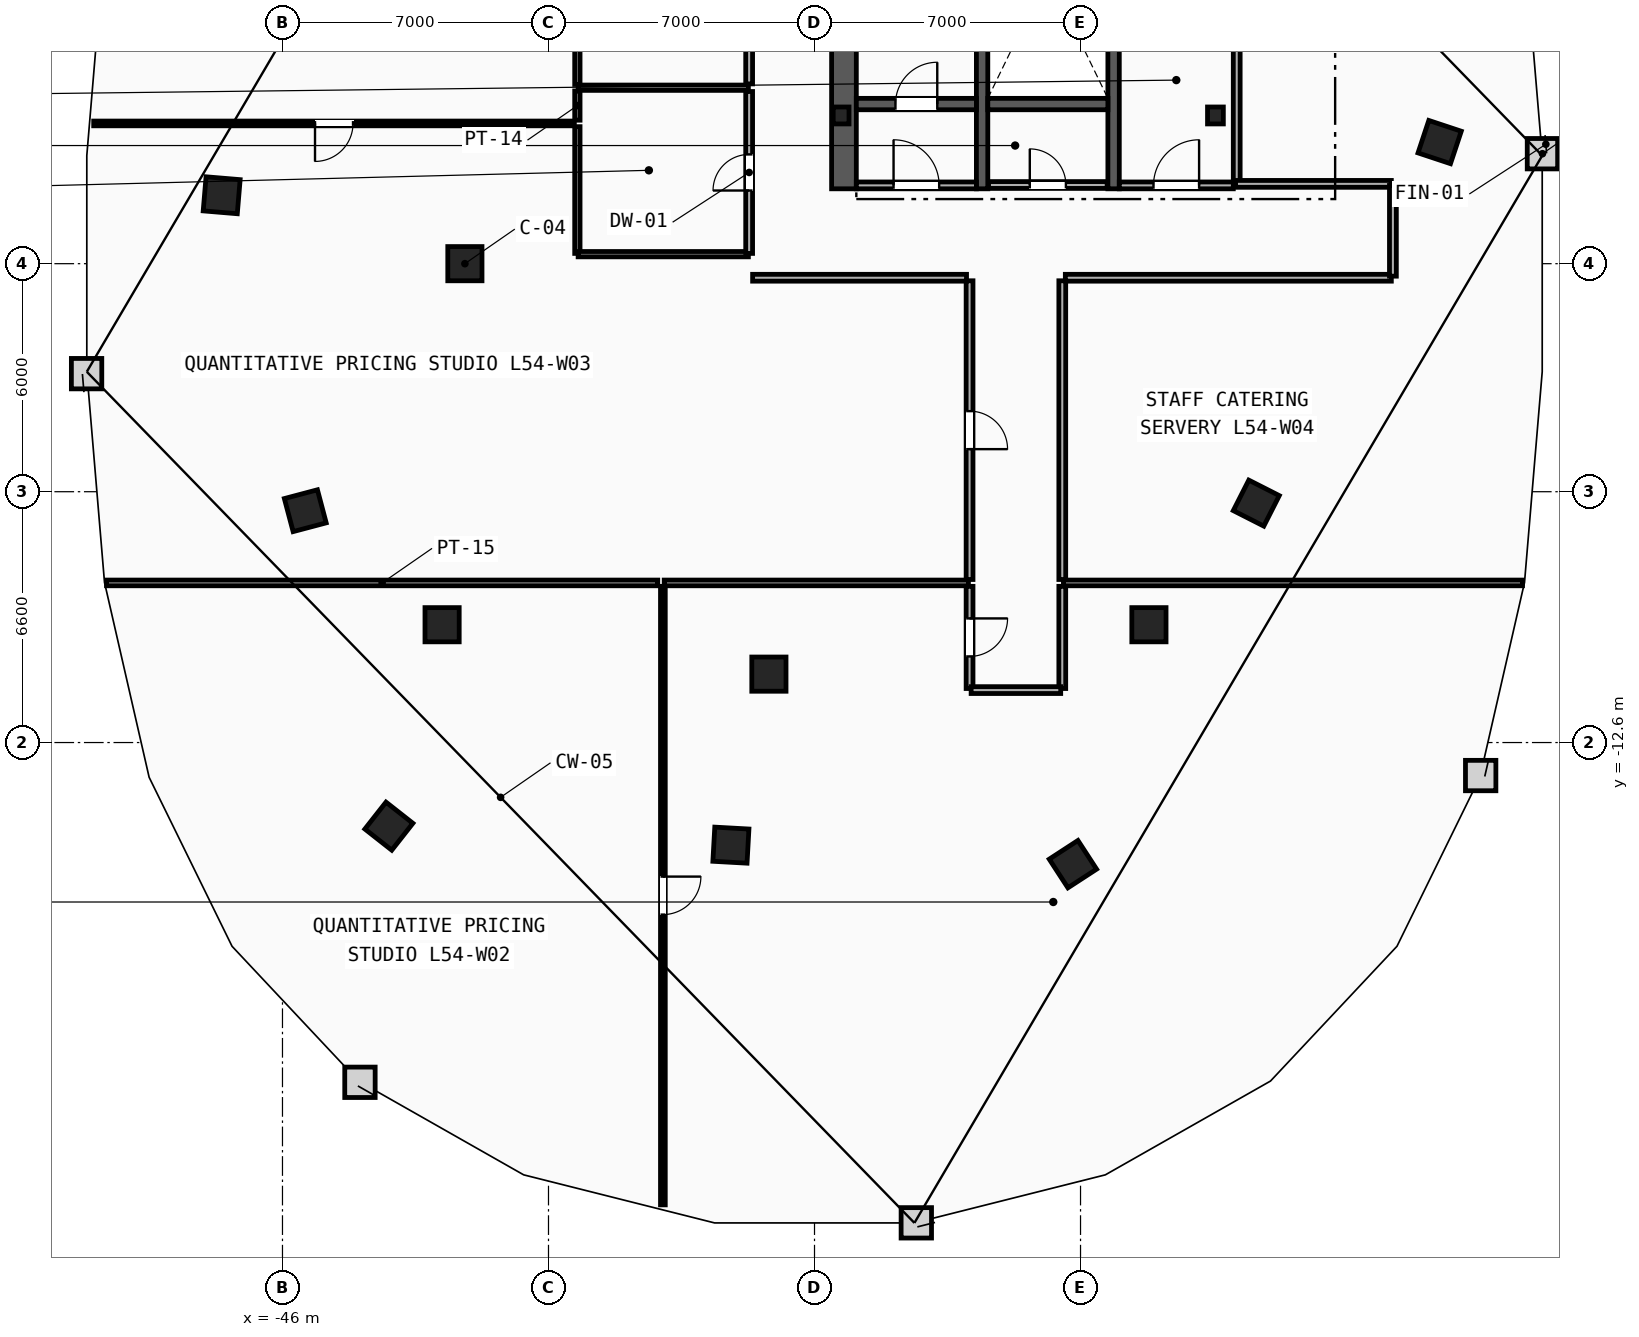
"""IFC4 building model, lengths in metres.
Left out: names, types, materials, properties, quantities, classifications, styles, units other than length and angle.
Written with IfcOpenShell. Run it as: python <this file> out.ifc"""

import sys

from ifc_helpers import new_model, si_unit, direction, frame, frame_2d, origin, origin_2d, place, context, subcontext, project, spatial, rectangle, i_section, extrude, element, fill, save


model = new_model("IFC4")
c1 = context("Model", 3, precision=1e-05, world=origin(), true_north=direction((0.0, 1.0)))
c2 = subcontext(c1, "Body", "Model", "MODEL_VIEW")
j1 = project(units=[si_unit("LENGTHUNIT", "METRE"), si_unit("PLANEANGLEUNIT", "RADIAN")], contexts=[c1])
p1 = place(None, origin())
s1 = spatial("IfcSite", under=j1, at=p1, CompositionType="ELEMENT")
p2 = place(p1, origin())
s2 = spatial("IfcBuilding", under=s1, at=p2, CompositionType="ELEMENT")
p3 = place(p2, frame((0.0, 0.0, 206.2)))
s3 = spatial("IfcBuildingStorey", under=s2, at=p3, CompositionType="ELEMENT", Elevation=206.2)
for number, where, z_axis, x_axis in (
    (1, (-31.3, 3.9, 0.0), (0.0, 0.0, 1.0), (1.0, 0.0, 0.0)),
    (2, (-21.45, 3.9, 0.0), (0.0, 0.0, 1.0), (1.0, 0.0, 0.0)),
):
    element("IfcColumn", number, at=place(p3, frame(where, z_axis=z_axis, x_axis=x_axis)), inside=s3, PredefinedType="COLUMN", context=c2, shape_type="SweptSolid", body=[
        extrude(i_section(OverallWidth=0.416, OverallDepth=0.446, WebThickness=0.039, FlangeThickness=0.063, FilletRadius=0.018, at=origin_2d()), origin(), (0.0, 0.0, 1.0), 3.6),
    ])
for number, where, z_axis, x_axis in (
    (3, (-41.2, 0.0, 0.0), (0.0, 0.0, 1.0), (1.0, 0.0, 0.0)),
    (4, (-41.8, -9.5, 0.0), (0.0, 0.0, 1.0), (1.0, 0.0, 0.0)),
    (5, (-33.2, -10.8, 0.0), (0.0, 0.0, 1.0), (1.0, 0.0, 0.0)),
    (6, (-23.2, -9.5, 0.0), (0.0, 0.0, 1.0), (1.0, 0.0, 0.0)),
    (7, (-15.55, 3.2, 0.0), (0.0, 0.0, 1.0), (0.315, 0.949, 0.0)),
    (8, (-47.6, 1.8, 0.0), (0.0, 0.0, 1.0), (-0.084, -0.997, 0.0)),
    (9, (-45.4, -6.5, 0.0), (0.0, 0.0, 1.0), (0.256, -0.967, 0.0)),
    (10, (-43.2, -14.8, 0.0), (0.0, 0.0, 1.0), (0.786, -0.618, 0.0)),
    (11, (-34.2, -15.3, 0.0), (0.0, 0.0, 1.0), (0.998, -0.055, 0.0)),
    (12, (-25.2, -15.8, 0.0), (0.0, 0.0, 1.0), (0.838, 0.546, 0.0)),
    (13, (-20.375, -6.3, 0.0), (0.0, 0.0, 1.0), (0.453, 0.892, 0.0)),
):
    element("IfcColumn", number, at=place(p3, frame(where, z_axis=z_axis, x_axis=x_axis)), inside=s3, PredefinedType="COLUMN", context=c2, shape_type="SweptSolid", body=[
        extrude(rectangle(XDim=0.9, YDim=0.9, at=origin_2d()), origin(), (0.0, 0.0, 1.0), 3.6),
    ])
p4 = place(p3, frame((-31.225, 1.97, 0.0), z_axis=(0.0, 0.0, 1.0), x_axis=(0.0, 1.0, 0.0)))
e14 = element("IfcWall", 14, at=p4, inside=s3, PredefinedType="SHEAR", context=c2, shape_type="SweptSolid", body=[
    extrude(rectangle(XDim=13.33, YDim=0.65, at=frame_2d((6.665, 0.0))), origin(), (0.0, 0.0, 1.0), 3.34),
])
for number, where, z_axis, x_axis in (
    (15, (-27.59, 1.97, 0.0), (0.0, 0.0, 1.0), (0.0, 1.0, 0.0)),
    (16, (-24.13, 1.97, 0.0), (0.0, 0.0, 1.0), (0.0, 1.0, 0.0)),
):
    element("IfcWall", number, at=place(p3, frame(where, z_axis=z_axis, x_axis=x_axis)), inside=s3, PredefinedType="SHEAR", context=c2, shape_type="SweptSolid", body=[
        extrude(rectangle(XDim=10.68, YDim=0.3, at=frame_2d((5.34, 0.0))), origin(), (0.0, 0.0, 1.0), 3.34),
    ])
p5 = place(p3, frame((-30.9, 4.2, 0.0), z_axis=(0.0, 0.0, 1.0), x_axis=(1.0, 0.0, 0.0)))
e17 = element("IfcWall", 17, at=p5, inside=s3, PredefinedType="SHEAR", context=c2, shape_type="SweptSolid", body=[
    extrude(rectangle(XDim=3.16, YDim=0.3, at=frame_2d((1.58, 0.0))), origin(), (0.0, 0.0, 1.0), 3.34),
])
p6 = place(p5, frame((1.03, 0.0, 0.0)))
e18 = element("IfcOpeningElement", 18, at=p6, cuts=e17, PredefinedType="OPENING", context=c2, shape_type="SweptSolid", body=[
    extrude(rectangle(XDim=1.1, YDim=2.15, at=frame_2d((0.55, 1.075))), frame((0.0, 0.16, 0.0), z_axis=(0.0, -1.0, 0.0), x_axis=(1.0, 0.0, 0.0)), (0.0, 0.0, 1.0), 0.32),
])
p7 = place(p3, frame((-27.44, 4.2, 0.0), z_axis=(0.0, 0.0, 1.0), x_axis=(1.0, 0.0, 0.0)))
e19 = element("IfcWall", 19, at=p7, inside=s3, PredefinedType="SHEAR", context=c2, shape_type="SweptSolid", body=[
    extrude(rectangle(XDim=3.16, YDim=0.3, at=frame_2d((1.58, 0.0))), origin(), (0.0, 0.0, 1.0), 3.34),
])
p8 = place(p3, frame((-20.89, 2.15, 0.0), z_axis=(0.0, 0.0, 1.0), x_axis=(0.0, 1.0, 0.0)))
e20 = element("IfcWall", 20, at=p8, inside=s3, PredefinedType="PARTITIONING", context=c2, shape_type="SweptSolid", body=[
    extrude(rectangle(XDim=5.3, YDim=0.18, at=frame_2d((2.65, 0.0))), origin(), (0.0, 0.0, 1.0), 3.34),
])
p9 = place(p3, frame((-23.98, 2.06, 0.0), z_axis=(0.0, 0.0, 1.0), x_axis=(1.0, 0.0, 0.0)))
e21 = element("IfcWall", 21, at=p9, inside=s3, PredefinedType="PARTITIONING", context=c2, shape_type="SweptSolid", body=[
    extrude(rectangle(XDim=3.0, YDim=0.18, at=frame_2d((1.5, 0.0))), origin(), (0.0, 0.0, 1.0), 3.34),
])
p10 = place(p9, frame((0.9, 0.0, 0.0)))
e22 = element("IfcOpeningElement", 22, at=p10, cuts=e21, PredefinedType="OPENING", context=c2, shape_type="SweptSolid", body=[
    extrude(rectangle(XDim=1.2, YDim=2.15, at=frame_2d((0.6, 1.075))), frame((0.0, 0.1, 0.0), z_axis=(0.0, -1.0, 0.0), x_axis=(1.0, 0.0, 0.0)), (0.0, 0.0, 1.0), 0.2),
])
p11 = place(p3, frame((-30.9, 2.06, 0.0), z_axis=(0.0, 0.0, 1.0), x_axis=(1.0, 0.0, 0.0)))
e23 = element("IfcWall", 23, at=p11, inside=s3, PredefinedType="PARTITIONING", context=c2, shape_type="SweptSolid", body=[
    extrude(rectangle(XDim=3.16, YDim=0.18, at=frame_2d((1.58, 0.0))), origin(), (0.0, 0.0, 1.0), 3.34),
])
p12 = place(p11, frame((0.98, 0.0, 0.0)))
e24 = element("IfcOpeningElement", 24, at=p12, cuts=e23, PredefinedType="OPENING", context=c2, shape_type="SweptSolid", body=[
    extrude(rectangle(XDim=1.2, YDim=2.15, at=frame_2d((0.6, 1.075))), frame((0.0, 0.1, 0.0), z_axis=(0.0, -1.0, 0.0), x_axis=(1.0, 0.0, 0.0)), (0.0, 0.0, 1.0), 0.2),
])
p13 = place(p3, frame((-27.42, 2.07, 0.0), z_axis=(0.0, 0.0, 1.0), x_axis=(1.0, 0.0, 0.0)))
e25 = element("IfcWall", 25, at=p13, inside=s3, PredefinedType="PARTITIONING", context=c2, shape_type="SweptSolid", body=[
    extrude(rectangle(XDim=3.12, YDim=0.18, at=frame_2d((1.56, 0.0))), origin(), (0.0, 0.0, 1.0), 3.34),
])
p14 = place(p13, frame((1.085, 0.0, 0.0)))
e26 = element("IfcOpeningElement", 26, at=p14, cuts=e25, PredefinedType="OPENING", context=c2, shape_type="SweptSolid", body=[
    extrude(rectangle(XDim=0.95, YDim=2.1, at=frame_2d((0.475, 1.05))), frame((0.0, 0.1, 0.0), z_axis=(0.0, -1.0, 0.0), x_axis=(1.0, 0.0, 0.0)), (0.0, 0.0, 1.0), 0.2),
])
p15 = place(p3, frame((-38.24, 0.27, 0.0), z_axis=(0.0, 0.0, 1.0), x_axis=(0.0, 1.0, 0.0)))
e27 = element("IfcWall", 27, at=p15, inside=s3, PredefinedType="PARTITIONING", context=c2, shape_type="SweptSolid", body=[
    extrude(rectangle(XDim=3.335, YDim=0.14, at=frame_2d((1.667, 0.0))), origin(), (0.0, 0.0, 1.0), 3.34),
])
p16 = place(p3, frame((-38.24, 3.775, 0.0), z_axis=(0.0, 0.0, 1.0), x_axis=(0.0, 1.0, 0.0)))
e28 = element("IfcWall", 28, at=p16, inside=s3, PredefinedType="PARTITIONING", context=c2, shape_type="SweptSolid", body=[
    extrude(rectangle(XDim=0.77, YDim=0.14, at=frame_2d((0.385, 0.0))), origin(), (0.0, 0.0, 1.0), 3.34),
])
p17 = place(p3, frame((-38.24, 4.715, 0.0), z_axis=(0.0, 0.0, 1.0), x_axis=(0.0, 1.0, 0.0)))
e29 = element("IfcWall", 29, at=p17, inside=s3, PredefinedType="PARTITIONING", context=c2, shape_type="SweptSolid", body=[
    extrude(rectangle(XDim=3.74, YDim=0.14, at=frame_2d((1.87, 0.0))), origin(), (0.0, 0.0, 1.0), 3.34),
])
for number, where, z_axis, x_axis in (
    (30, (-38.22, 0.25, 0.0), (0.0, 0.0, 1.0), (1.0, 0.0, 0.0)),
    (31, (-38.22, 4.63, 0.0), (0.0, 0.0, 1.0), (1.0, 0.0, 0.0)),
):
    element("IfcWall", number, at=place(p3, frame(where, z_axis=z_axis, x_axis=x_axis)), inside=s3, PredefinedType="PARTITIONING", context=c2, shape_type="SweptSolid", body=[
        extrude(rectangle(XDim=4.48, YDim=0.14, at=frame_2d((2.24, 0.0))), origin(), (0.0, 0.0, 1.0), 3.34),
    ])
p18 = place(p3, frame((-33.72, 0.27, 0.0), z_axis=(0.0, 0.0, 1.0), x_axis=(0.0, 1.0, 0.0)))
e32 = element("IfcWall", 32, at=p18, inside=s3, PredefinedType="PARTITIONING", context=c2, shape_type="SweptSolid", body=[
    extrude(rectangle(XDim=4.26, YDim=0.18, at=frame_2d((2.13, 0.0))), origin(), (0.0, 0.0, 1.0), 3.34),
])
p19 = place(p18, frame((1.655, 0.0, 0.0)))
e33 = element("IfcOpeningElement", 33, at=p19, cuts=e32, PredefinedType="OPENING", context=c2, shape_type="SweptSolid", body=[
    extrude(rectangle(XDim=0.95, YDim=2.1, at=frame_2d((0.475, 1.05))), frame((0.0, 0.1, 0.0), z_axis=(0.0, -1.0, 0.0), x_axis=(1.0, 0.0, 0.0)), (0.0, 0.0, 1.0), 0.2),
])
p20 = place(p3, frame((-33.72, 4.73, 0.0), z_axis=(0.0, 0.0, 1.0), x_axis=(0.0, 1.0, 0.0)))
e34 = element("IfcWall", 34, at=p20, inside=s3, PredefinedType="PARTITIONING", context=c2, shape_type="SweptSolid", body=[
    extrude(rectangle(XDim=4.16, YDim=0.18, at=frame_2d((2.08, 0.0))), origin(), (0.0, 0.0, 1.0), 3.34),
])
p21 = place(p20, frame((1.58, 0.0, 0.0)))
e35 = element("IfcOpeningElement", 35, at=p21, cuts=e34, PredefinedType="OPENING", context=c2, shape_type="SweptSolid", body=[
    extrude(rectangle(XDim=1.0, YDim=2.15, at=frame_2d((0.5, 1.075))), frame((0.0, 0.1, 0.0), z_axis=(0.0, -1.0, 0.0), x_axis=(1.0, 0.0, 0.0)), (0.0, 0.0, 1.0), 0.2),
])
p22 = place(p3, frame((-50.63, -8.4, 0.0), z_axis=(0.0, 0.0, 1.0), x_axis=(1.0, 0.0, 0.0)))
e36 = element("IfcWall", 36, at=p22, inside=s3, PredefinedType="PARTITIONING", context=c2, shape_type="SweptSolid", body=[
    extrude(rectangle(XDim=14.505, YDim=0.15, at=frame_2d((7.252, 0.0))), origin(), (0.0, 0.0, 1.0), 3.34),
])
p23 = place(p3, frame((-35.955, -8.4, 0.0), z_axis=(0.0, 0.0, 1.0), x_axis=(1.0, 0.0, 0.0)))
e37 = element("IfcWall", 37, at=p23, inside=s3, PredefinedType="PARTITIONING", context=c2, shape_type="SweptSolid", body=[
    extrude(rectangle(XDim=8.005, YDim=0.15, at=frame_2d((4.002, 0.0))), origin(), (0.0, 0.0, 1.0), 3.34),
])
p24 = place(p3, frame((-25.45, -8.4, 0.0), z_axis=(0.0, 0.0, 1.0), x_axis=(1.0, 0.0, 0.0)))
e38 = element("IfcWall", 38, at=p24, inside=s3, PredefinedType="PARTITIONING", context=c2, shape_type="SweptSolid", body=[
    extrude(rectangle(XDim=12.08, YDim=0.15, at=frame_2d((6.04, 0.0))), origin(), (0.0, 0.0, 1.0), 3.34),
])
p25 = place(p3, frame((-27.92, -8.49, 0.0), z_axis=(0.0, 0.0, 1.0), x_axis=(0.0, -1.0, 0.0)))
e39 = element("IfcWall", 39, at=p25, inside=s3, PredefinedType="PARTITIONING", context=c2, shape_type="SweptSolid", body=[
    extrude(rectangle(XDim=2.688, YDim=0.18, at=frame_2d((1.344, 0.0))), origin(), (0.0, 0.0, 1.0), 3.34),
])
p26 = place(p25, frame((0.844, 0.0, 0.0)))
e40 = element("IfcOpeningElement", 40, at=p26, cuts=e39, PredefinedType="OPENING", context=c2, shape_type="SweptSolid", body=[
    extrude(rectangle(XDim=1.0, YDim=2.15, at=frame_2d((0.5, 1.075))), frame((0.0, 0.1, 0.0), z_axis=(0.0, -1.0, 0.0), x_axis=(1.0, 0.0, 0.0)), (0.0, 0.0, 1.0), 0.2),
])
p27 = place(p3, frame((-25.48, -11.178, 0.0), z_axis=(0.0, 0.0, 1.0), x_axis=(0.0, 1.0, 0.0)))
e41 = element("IfcWall", 41, at=p27, inside=s3, PredefinedType="PARTITIONING", context=c2, shape_type="SweptSolid", body=[
    extrude(rectangle(XDim=2.688, YDim=0.18, at=frame_2d((1.344, 0.0))), origin(), (0.0, 0.0, 1.0), 3.34),
])
p28 = place(p3, frame((-27.878, -11.22, 0.0), z_axis=(0.0, 0.0, 1.0), x_axis=(1.0, 0.0, 0.0)))
e42 = element("IfcWall", 42, at=p28, inside=s3, PredefinedType="PARTITIONING", context=c2, shape_type="SweptSolid", body=[
    extrude(rectangle(XDim=2.357, YDim=0.18, at=frame_2d((1.178, 0.0))), origin(), (0.0, 0.0, 1.0), 3.34),
])
p29 = place(p3, frame((-27.92, -0.45, 0.0), z_axis=(0.0, 0.0, 1.0), x_axis=(0.0, -1.0, 0.0)))
e43 = element("IfcWall", 43, at=p29, inside=s3, PredefinedType="PARTITIONING", context=c2, shape_type="SweptSolid", body=[
    extrude(rectangle(XDim=7.86, YDim=0.18, at=frame_2d((3.93, 0.0))), origin(), (0.0, 0.0, 1.0), 3.34),
])
p30 = place(p29, frame((3.43, 0.0, 0.0)))
e44 = element("IfcOpeningElement", 44, at=p30, cuts=e43, PredefinedType="OPENING", context=c2, shape_type="SweptSolid", body=[
    extrude(rectangle(XDim=1.0, YDim=2.15, at=frame_2d((0.5, 1.075))), frame((0.0, 0.1, 0.0), z_axis=(0.0, -1.0, 0.0), x_axis=(1.0, 0.0, 0.0)), (0.0, 0.0, 1.0), 0.2),
])
p31 = place(p3, frame((-33.628, -0.37, 0.0), z_axis=(0.0, 0.0, 1.0), x_axis=(1.0, 0.0, 0.0)))
e45 = element("IfcWall", 45, at=p31, inside=s3, PredefinedType="PARTITIONING", context=c2, shape_type="SweptSolid", body=[
    extrude(rectangle(XDim=5.628, YDim=0.18, at=frame_2d((2.814, 0.0))), origin(), (0.0, 0.0, 1.0), 3.34),
])
p32 = place(p3, frame((-25.4, -0.37, 0.0), z_axis=(0.0, 0.0, 1.0), x_axis=(1.0, 0.0, 0.0)))
e46 = element("IfcWall", 46, at=p32, inside=s3, PredefinedType="PARTITIONING", context=c2, shape_type="SweptSolid", body=[
    extrude(rectangle(XDim=8.578, YDim=0.18, at=frame_2d((4.289, 0.0))), origin(), (0.0, 0.0, 1.0), 3.34),
])
p33 = place(p3, frame((-25.48, -8.31, 0.0), z_axis=(0.0, 0.0, 1.0), x_axis=(0.0, 1.0, 0.0)))
e47 = element("IfcWall", 47, at=p33, inside=s3, PredefinedType="PARTITIONING", context=c2, shape_type="SweptSolid", body=[
    extrude(rectangle(XDim=7.86, YDim=0.18, at=frame_2d((3.93, 0.0))), origin(), (0.0, 0.0, 1.0), 3.34),
])
p34 = place(p3, frame((-16.822, 2.1, 0.0), z_axis=(0.0, 0.0, 1.0), x_axis=(-1.0, 0.0, 0.0)))
e48 = element("IfcWall", 48, at=p34, inside=s3, PredefinedType="PARTITIONING", context=c2, shape_type="SweptSolid", body=[
    extrude(rectangle(XDim=4.098, YDim=0.18, at=frame_2d((2.049, 0.0))), origin(), (0.0, 0.0, 1.0), 3.34),
])
p35 = place(p3, frame((-16.78, -0.329, 0.0), z_axis=(0.0, 0.0, 1.0), x_axis=(0.0, 1.0, 0.0)))
e49 = element("IfcWall", 49, at=p35, inside=s3, PredefinedType="PARTITIONING", context=c2, shape_type="SweptSolid", body=[
    extrude(rectangle(XDim=2.387, YDim=0.18, at=frame_2d((1.194, 0.0))), origin(), (0.0, 0.0, 1.0), 3.34),
])
p36 = place(p3, frame((-35.99, -8.49, 0.0), z_axis=(0.0, 0.0, 1.0), x_axis=(0.0, -1.0, 0.0)))
e50 = element("IfcWall", 50, at=p36, inside=s3, PredefinedType="PARTITIONING", context=c2, shape_type="SweptSolid", body=[
    extrude(rectangle(XDim=16.275, YDim=0.125, at=frame_2d((8.137, 0.0))), origin(), (0.0, 0.0, 1.0), 3.34),
])
p37 = place(p36, frame((7.637, 0.0, 0.0)))
e51 = element("IfcOpeningElement", 51, at=p37, cuts=e50, PredefinedType="OPENING", context=c2, shape_type="SweptSolid", body=[
    extrude(rectangle(XDim=1.0, YDim=2.15, at=frame_2d((0.5, 1.075))), frame((0.0, 0.073, 0.0), z_axis=(0.0, -1.0, 0.0), x_axis=(1.0, 0.0, 0.0)), (0.0, 0.0, 1.0), 0.145),
])
p38 = place(p3, frame((-38.32, 3.69, 0.0), z_axis=(0.0, 0.0, 1.0), x_axis=(-1.0, 0.0, 0.0)))
e52 = element("IfcWall", 52, at=p38, inside=s3, PredefinedType="PARTITIONING", context=c2, shape_type="SweptSolid", body=[
    extrude(rectangle(XDim=12.647, YDim=0.125, at=frame_2d((6.324, 0.0))), origin(), (0.0, 0.0, 1.0), 3.34),
])
p39 = place(p38, frame((5.824, 0.0, 0.0)))
e53 = element("IfcOpeningElement", 53, at=p39, cuts=e52, PredefinedType="OPENING", context=c2, shape_type="SweptSolid", body=[
    extrude(rectangle(XDim=1.0, YDim=2.15, at=frame_2d((0.5, 1.075))), frame((0.0, 0.073, 0.0), z_axis=(0.0, -1.0, 0.0), x_axis=(1.0, 0.0, 0.0)), (0.0, 0.0, 1.0), 0.145),
])
p40 = place(p6, origin())
e54 = element("IfcDoor", 54, at=p40, inside=s3, OperationType="SINGLE_SWING_RIGHT", PredefinedType="DOOR", context=c2, shape_type="SweptSolid", body=[
    extrude(rectangle(XDim=1.1, YDim=2.15, at=frame_2d((0.55, 1.075))), frame((0.0, 0.025, 0.0), z_axis=(0.0, -1.0, 0.0), x_axis=(1.0, 0.0, 0.0)), (0.0, 0.0, 1.0), 0.05),
])
fill(e18, e54)
p41 = place(p10, origin())
e55 = element("IfcDoor", 55, at=p41, inside=s3, OperationType="SINGLE_SWING_RIGHT", PredefinedType="DOOR", context=c2, shape_type="SweptSolid", body=[
    extrude(rectangle(XDim=1.2, YDim=2.15, at=frame_2d((0.6, 1.075))), frame((0.0, 0.025, 0.0), z_axis=(0.0, -1.0, 0.0), x_axis=(1.0, 0.0, 0.0)), (0.0, 0.0, 1.0), 0.05),
])
fill(e22, e55)
p42 = place(p12, origin())
e56 = element("IfcDoor", 56, at=p42, inside=s3, OperationType="SINGLE_SWING_LEFT", PredefinedType="DOOR", context=c2, shape_type="SweptSolid", body=[
    extrude(rectangle(XDim=1.2, YDim=2.15, at=frame_2d((0.6, 1.075))), frame((0.0, 0.025, 0.0), z_axis=(0.0, -1.0, 0.0), x_axis=(1.0, 0.0, 0.0)), (0.0, 0.0, 1.0), 0.05),
])
fill(e24, e56)
p43 = place(p37, origin())
e57 = element("IfcDoor", 57, at=p43, inside=s3, OperationType="SINGLE_SWING_LEFT", PredefinedType="DOOR", context=c2, shape_type="SweptSolid", body=[
    extrude(rectangle(XDim=1.0, YDim=2.15, at=frame_2d((0.5, 1.075))), frame((0.0, 0.025, 0.0), z_axis=(0.0, -1.0, 0.0), x_axis=(1.0, 0.0, 0.0)), (0.0, 0.0, 1.0), 0.05),
])
fill(e51, e57)
p44 = place(p39, origin())
e58 = element("IfcDoor", 58, at=p44, inside=s3, OperationType="SINGLE_SWING_RIGHT", PredefinedType="DOOR", context=c2, shape_type="SweptSolid", body=[
    extrude(rectangle(XDim=1.0, YDim=2.15, at=frame_2d((0.5, 1.075))), frame((0.0, 0.025, 0.0), z_axis=(0.0, -1.0, 0.0), x_axis=(1.0, 0.0, 0.0)), (0.0, 0.0, 1.0), 0.05),
])
fill(e53, e58)
p45 = place(p30, origin())
e59 = element("IfcDoor", 59, at=p45, inside=s3, OperationType="SINGLE_SWING_RIGHT", PredefinedType="DOOR", context=c2, shape_type="SweptSolid", body=[
    extrude(rectangle(XDim=1.0, YDim=2.15, at=frame_2d((0.5, 1.075))), frame((0.0, 0.025, 0.0), z_axis=(0.0, -1.0, 0.0), x_axis=(1.0, 0.0, 0.0)), (0.0, 0.0, 1.0), 0.05),
])
fill(e44, e59)
p46 = place(p19, origin())
e60 = element("IfcDoor", 60, at=p46, inside=s3, OperationType="SINGLE_SWING_LEFT", PredefinedType="DOOR", context=c2, shape_type="SweptSolid", body=[
    extrude(rectangle(XDim=0.95, YDim=2.1, at=frame_2d((0.475, 1.05))), frame((0.0, 0.025, 0.0), z_axis=(0.0, -1.0, 0.0), x_axis=(1.0, 0.0, 0.0)), (0.0, 0.0, 1.0), 0.05),
])
fill(e33, e60)
p47 = place(p14, origin())
e61 = element("IfcDoor", 61, at=p47, inside=s3, OperationType="SINGLE_SWING_LEFT", PredefinedType="DOOR", context=c2, shape_type="SweptSolid", body=[
    extrude(rectangle(XDim=0.95, YDim=2.1, at=frame_2d((0.475, 1.05))), frame((0.0, 0.025, 0.0), z_axis=(0.0, -1.0, 0.0), x_axis=(1.0, 0.0, 0.0)), (0.0, 0.0, 1.0), 0.05),
])
fill(e26, e61)
p48 = place(p26, origin())
e62 = element("IfcDoor", 62, at=p48, inside=s3, OperationType="SINGLE_SWING_LEFT", PredefinedType="DOOR", context=c2, shape_type="SweptSolid", body=[
    extrude(rectangle(XDim=1.0, YDim=2.15, at=frame_2d((0.5, 1.075))), frame((0.0, 0.025, 0.0), z_axis=(0.0, -1.0, 0.0), x_axis=(1.0, 0.0, 0.0)), (0.0, 0.0, 1.0), 0.05),
])
fill(e40, e62)
save(model, sys.argv[1])
